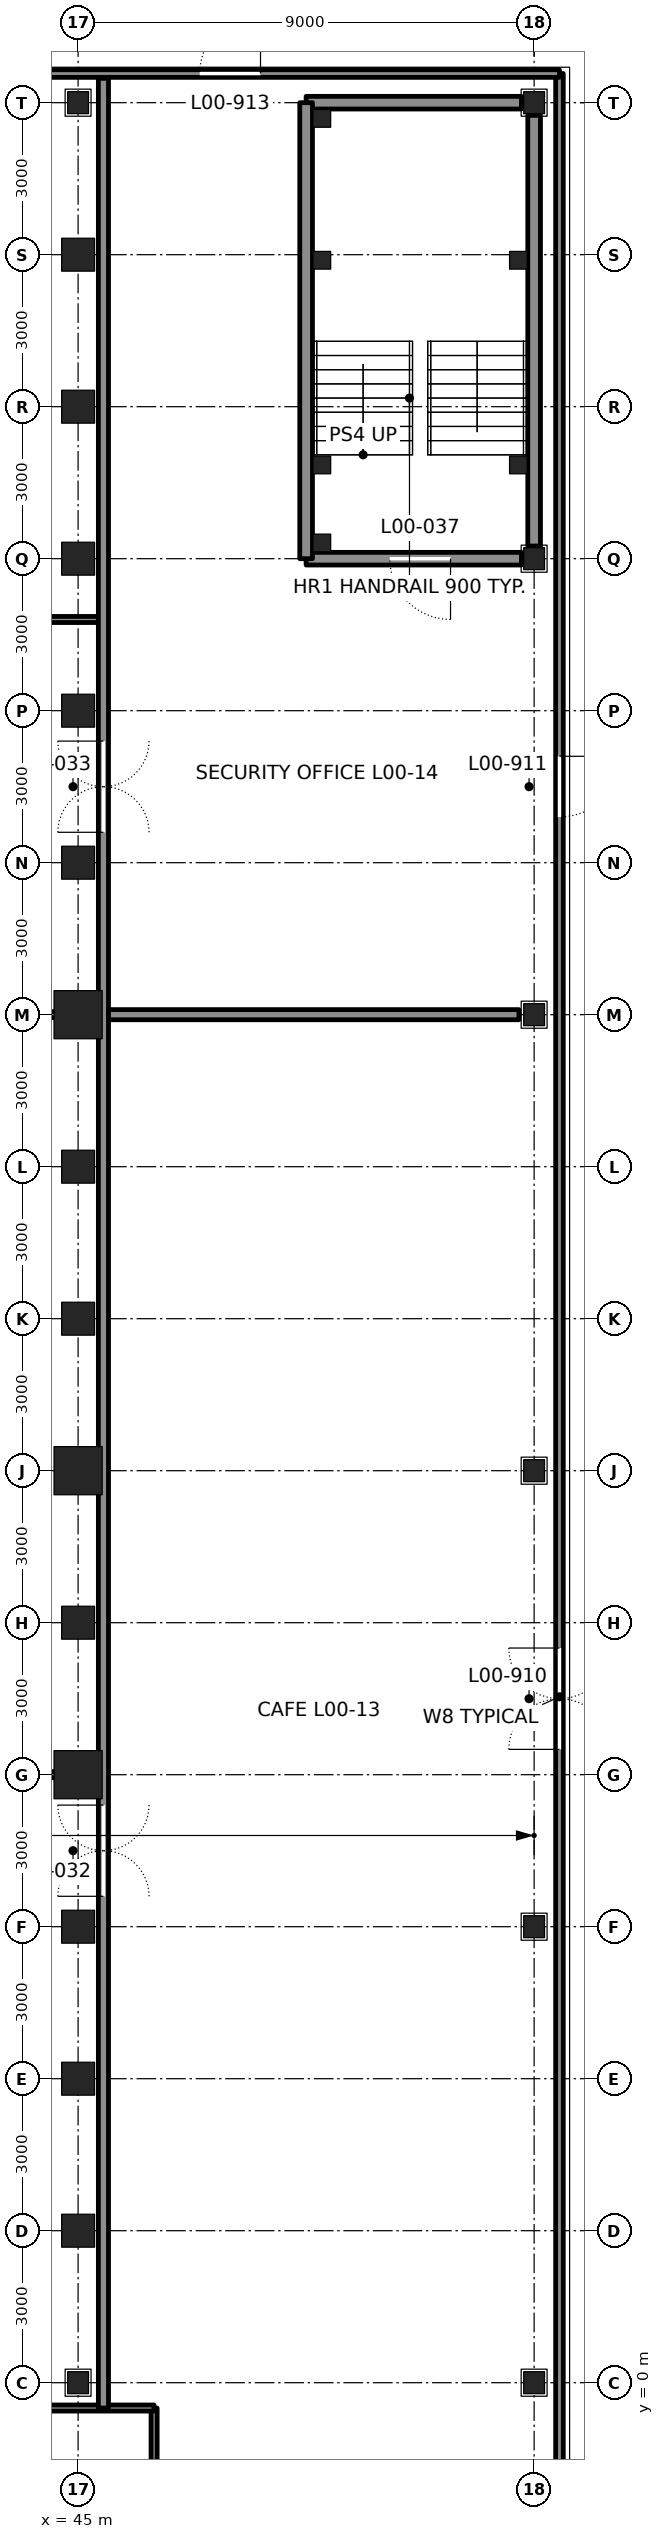
"""IFC4 building model, lengths in metres.
Left out: names, types, materials, properties, quantities, classifications, styles, units other than length and angle.
Written with IfcOpenShell. Run it as: python <this file> out.ifc"""

import sys

from ifc_helpers import new_model, si_unit, direction, frame, frame_2d, origin, origin_2d, place, context, subcontext, project, spatial, rectangle, hollow_rectangle, i_section, extrude, element, fill, save


model = new_model("IFC4")
c1 = context("Model", 3, precision=1e-05, world=origin(), true_north=direction((0.0, 1.0)))
c2 = subcontext(c1, "Body", "Model", "MODEL_VIEW")
j1 = project(units=[si_unit("LENGTHUNIT", "METRE"), si_unit("PLANEANGLEUNIT", "RADIAN")], contexts=[c1])
p1 = place(None, origin())
s1 = spatial("IfcSite", under=j1, at=p1, CompositionType="ELEMENT")
p2 = place(p1, origin())
s2 = spatial("IfcBuilding", under=s1, at=p2, CompositionType="ELEMENT")
p3 = place(p2, origin())
s3 = spatial("IfcBuildingStorey", under=s2, at=p3, CompositionType="ELEMENT", Elevation=0.0)
for number, where, z_axis, x_axis in (
    (1, (45.0, 3.0, 0.0), (0.0, 0.0, 1.0), (1.0, 0.0, 0.0)),
    (2, (45.0, 6.0, 0.0), (0.0, 0.0, 1.0), (1.0, 0.0, 0.0)),
    (3, (45.0, 9.0, 0.0), (0.0, 0.0, 1.0), (1.0, 0.0, 0.0)),
):
    element("IfcColumn", number, at=place(p3, frame(where, z_axis=z_axis, x_axis=x_axis)), inside=s3, PredefinedType="COLUMN", context=c2, shape_type="SweptSolid", body=[
        extrude(hollow_rectangle(XDim=0.65, YDim=0.65, WallThickness=0.065, at=origin_2d()), origin(), (0.0, 0.0, 1.0), 6.0),
    ])
p4 = place(p3, frame((45.0, 12.0, 0.0), z_axis=(0.0, 0.0, 1.0), x_axis=(1.0, 0.0, 0.0)))
e4 = element("IfcColumn", 4, at=p4, inside=s3, PredefinedType="COLUMN", context=c2, shape_type="SweptSolid", body=[
    extrude(hollow_rectangle(XDim=0.95, YDim=0.95, WallThickness=0.11, at=origin_2d()), origin(), (0.0, 0.0, 1.0), 6.0),
])
p5 = place(p3, frame((45.0, 15.0, 0.0), z_axis=(0.0, 0.0, 1.0), x_axis=(1.0, 0.0, 0.0)))
e5 = element("IfcColumn", 5, at=p5, inside=s3, PredefinedType="COLUMN", context=c2, shape_type="SweptSolid", body=[
    extrude(hollow_rectangle(XDim=0.65, YDim=0.65, WallThickness=0.065, at=origin_2d()), origin(), (0.0, 0.0, 1.0), 6.0),
])
p6 = place(p3, frame((45.0, 18.0, 0.0), z_axis=(0.0, 0.0, 1.0), x_axis=(1.0, 0.0, 0.0)))
e6 = element("IfcColumn", 6, at=p6, inside=s3, PredefinedType="COLUMN", context=c2, shape_type="SweptSolid", body=[
    extrude(hollow_rectangle(XDim=0.95, YDim=0.95, WallThickness=0.11, at=origin_2d()), origin(), (0.0, 0.0, 1.0), 6.0),
])
for number, where, z_axis, x_axis in (
    (7, (45.0, 21.0, 0.0), (0.0, 0.0, 1.0), (1.0, 0.0, 0.0)),
    (8, (45.0, 24.0, 0.0), (0.0, 0.0, 1.0), (1.0, 0.0, 0.0)),
):
    element("IfcColumn", number, at=place(p3, frame(where, z_axis=z_axis, x_axis=x_axis)), inside=s3, PredefinedType="COLUMN", context=c2, shape_type="SweptSolid", body=[
        extrude(hollow_rectangle(XDim=0.65, YDim=0.65, WallThickness=0.065, at=origin_2d()), origin(), (0.0, 0.0, 1.0), 6.0),
    ])
p7 = place(p3, frame((45.0, 27.0, 0.0), z_axis=(0.0, 0.0, 1.0), x_axis=(1.0, 0.0, 0.0)))
e9 = element("IfcColumn", 9, at=p7, inside=s3, PredefinedType="COLUMN", context=c2, shape_type="SweptSolid", body=[
    extrude(hollow_rectangle(XDim=0.95, YDim=0.95, WallThickness=0.11, at=origin_2d()), origin(), (0.0, 0.0, 1.0), 6.0),
])
for number, where, z_axis, x_axis in (
    (10, (45.0, 30.0, 0.0), (0.0, 0.0, 1.0), (1.0, 0.0, 0.0)),
    (11, (45.0, 33.0, 0.0), (0.0, 0.0, 1.0), (1.0, 0.0, 0.0)),
    (12, (45.0, 36.0, 0.0), (0.0, 0.0, 1.0), (1.0, 0.0, 0.0)),
    (13, (45.0, 39.0, 0.0), (0.0, 0.0, 1.0), (1.0, 0.0, 0.0)),
    (14, (45.0, 42.0, 0.0), (0.0, 0.0, 1.0), (1.0, 0.0, 0.0)),
):
    element("IfcColumn", number, at=place(p3, frame(where, z_axis=z_axis, x_axis=x_axis)), inside=s3, PredefinedType="COLUMN", context=c2, shape_type="SweptSolid", body=[
        extrude(hollow_rectangle(XDim=0.65, YDim=0.65, WallThickness=0.065, at=origin_2d()), origin(), (0.0, 0.0, 1.0), 6.0),
    ])
for number, where, z_axis, x_axis in (
    (15, (45.0, 0.0, 0.0), (0.0, 0.0, 1.0), (1.0, 0.0, 0.0)),
    (16, (45.0, 45.0, 0.0), (0.0, 0.0, 1.0), (1.0, 0.0, 0.0)),
    (17, (54.0, 0.0, 0.0), (0.0, 0.0, 1.0), (1.0, 0.0, 0.0)),
    (18, (54.0, 9.0, 0.0), (0.0, 0.0, 1.0), (1.0, 0.0, 0.0)),
    (19, (54.0, 18.0, 0.0), (0.0, 0.0, 1.0), (1.0, 0.0, 0.0)),
    (20, (54.0, 27.0, 0.0), (0.0, 0.0, 1.0), (1.0, 0.0, 0.0)),
    (21, (54.0, 36.0, 0.0), (0.0, 0.0, 1.0), (1.0, 0.0, 0.0)),
    (22, (54.0, 45.0, 0.0), (0.0, 0.0, 1.0), (1.0, 0.0, 0.0)),
):
    element("IfcColumn", number, at=place(p3, frame(where, z_axis=z_axis, x_axis=x_axis)), inside=s3, PredefinedType="COLUMN", context=c2, shape_type="SweptSolid", body=[
        extrude(i_section(OverallWidth=0.411, OverallDepth=0.434, WebThickness=0.036, FlangeThickness=0.057, at=origin_2d()), origin(), (0.0, 0.0, 1.0), 6.0),
    ])
p8 = place(p3, frame((54.5, -18.5, 0.0), z_axis=(0.0, 0.0, 1.0), x_axis=(0.0, 1.0, 0.0)))
e23 = element("IfcWall", 23, at=p8, inside=s3, PredefinedType="SOLIDWALL", context=c2, shape_type="SweptSolid", body=[
    extrude(rectangle(XDim=64.075, YDim=0.15, at=frame_2d((32.038, 0.0))), origin(), (0.0, 0.0, 1.0), 5.8),
])
p9 = place(p8, frame((31.0, 0.0, 0.0)))
e24 = element("IfcOpeningElement", 24, at=p9, cuts=e23, PredefinedType="OPENING", context=c2, shape_type="SweptSolid", body=[
    extrude(rectangle(XDim=2.0, YDim=2.4, at=frame_2d((1.0, 1.2))), frame((0.0, 0.085, 0.0), z_axis=(0.0, -1.0, 0.0), x_axis=(1.0, 0.0, 0.0)), (0.0, 0.0, 1.0), 0.17),
])
p10 = place(p8, frame((49.4, 0.0, 0.0)))
e25 = element("IfcOpeningElement", 25, at=p10, cuts=e23, PredefinedType="OPENING", context=c2, shape_type="SweptSolid", body=[
    extrude(rectangle(XDim=1.2, YDim=2.1, at=frame_2d((0.6, 1.05))), frame((0.0, 0.085, 0.0), z_axis=(0.0, -1.0, 0.0), x_axis=(1.0, 0.0, 0.0)), (0.0, 0.0, 1.0), 0.17),
])
p11 = place(p3, frame((54.5, 45.575, 0.0), z_axis=(0.0, 0.0, 1.0), x_axis=(-1.0, 0.0, 0.0)))
e26 = element("IfcWall", 26, at=p11, inside=s3, PredefinedType="SOLIDWALL", context=c2, shape_type="SweptSolid", body=[
    extrude(rectangle(XDim=64.0, YDim=0.15, at=frame_2d((32.0, 0.0))), origin(), (0.0, 0.0, 1.0), 5.8),
])
p12 = place(p11, frame((56.9, 0.0, 0.0)))
e27 = element("IfcOpeningElement", 27, at=p12, cuts=e26, PredefinedType="OPENING", context=c2, shape_type="SweptSolid", body=[
    extrude(rectangle(XDim=1.2, YDim=2.1, at=frame_2d((0.6, 1.05))), frame((0.0, 0.085, 0.0), z_axis=(0.0, -1.0, 0.0), x_axis=(1.0, 0.0, 0.0)), (0.0, 0.0, 1.0), 0.17),
])
p13 = place(p11, frame((5.9, 0.0, 0.0)))
e28 = element("IfcOpeningElement", 28, at=p13, cuts=e26, PredefinedType="OPENING", context=c2, shape_type="SweptSolid", body=[
    extrude(rectangle(XDim=1.2, YDim=2.1, at=frame_2d((0.6, 1.05))), frame((0.0, 0.085, 0.0), z_axis=(0.0, -1.0, 0.0), x_axis=(1.0, 0.0, 0.0)), (0.0, 0.0, 1.0), 0.17),
])
p14 = place(p3, frame((22.5, 34.8, 0.0), z_axis=(0.0, 0.0, 1.0), x_axis=(1.0, 0.0, 0.0)))
e29 = element("IfcWall", 29, at=p14, inside=s3, PredefinedType="PARTITIONING", context=c2, shape_type="SweptSolid", body=[
    extrude(rectangle(XDim=23.0, YDim=0.12, at=frame_2d((11.5, 0.0))), origin(), (0.0, 0.0, 1.0), 5.8),
])
p15 = place(p14, frame((11.0, 0.0, 0.0)))
e30 = element("IfcOpeningElement", 30, at=p15, cuts=e29, PredefinedType="OPENING", context=c2, shape_type="SweptSolid", body=[
    extrude(rectangle(XDim=1.0, YDim=2.4, at=frame_2d((0.5, 1.2))), frame((0.0, 0.07, 0.0), z_axis=(0.0, -1.0, 0.0), x_axis=(1.0, 0.0, 0.0)), (0.0, 0.0, 1.0), 0.14),
])
p16 = place(p3, frame((34.8, 12.0, 0.0), z_axis=(0.0, 0.0, 1.0), x_axis=(1.0, 0.0, 0.0)))
e31 = element("IfcWall", 31, at=p16, inside=s3, PredefinedType="PARTITIONING", context=c2, shape_type="SweptSolid", body=[
    extrude(rectangle(XDim=10.7, YDim=0.12, at=frame_2d((5.35, 0.0))), origin(), (0.0, 0.0, 1.0), 4.941),
])
p17 = place(p3, frame((34.8, 27.0, 0.0), z_axis=(0.0, 0.0, 1.0), x_axis=(1.0, 0.0, 0.0)))
e32 = element("IfcWall", 32, at=p17, inside=s3, PredefinedType="PARTITIONING", context=c2, shape_type="SweptSolid", body=[
    extrude(rectangle(XDim=10.7, YDim=0.12, at=frame_2d((5.35, 0.0))), origin(), (0.0, 0.0, 1.0), 4.853),
])
p18 = place(p3, frame((46.5, -18.405, 0.0), z_axis=(0.0, 0.0, 1.0), x_axis=(0.0, 1.0, 0.0)))
e33 = element("IfcWall", 33, at=p18, inside=s3, PredefinedType="PARTITIONING", context=c2, shape_type="SweptSolid", body=[
    extrude(rectangle(XDim=17.905, YDim=0.12, at=frame_2d((8.953, 0.0))), origin(), (0.0, 0.0, 1.0), 5.8),
])
p19 = place(p3, frame((36.0, -0.5, 0.0), z_axis=(0.0, 0.0, 1.0), x_axis=(1.0, 0.0, 0.0)))
e34 = element("IfcWall", 34, at=p19, inside=s3, PredefinedType="PARTITIONING", context=c2, shape_type="SweptSolid", body=[
    extrude(rectangle(XDim=10.5, YDim=0.12, at=frame_2d((5.25, 0.0))), origin(), (0.0, 0.0, 1.0), 5.8),
])
p20 = place(p3, frame((45.5, -0.5, 0.0), z_axis=(0.0, 0.0, 1.0), x_axis=(0.0, 1.0, 0.0)))
e35 = element("IfcWall", 35, at=p20, inside=s3, PredefinedType="PARTITIONING", context=c2, shape_type="SweptSolid", body=[
    extrude(rectangle(XDim=45.98, YDim=0.2, at=frame_2d((22.99, 0.0))), origin(), (0.0, 0.0, 1.0), 5.8),
])
p21 = place(p20, frame((10.1, 0.0, 0.0)))
e36 = element("IfcOpeningElement", 36, at=p21, cuts=e35, PredefinedType="OPENING", context=c2, shape_type="SweptSolid", body=[
    extrude(rectangle(XDim=1.8, YDim=2.4, at=frame_2d((0.9, 1.2))), frame((0.0, 0.11, 0.0), z_axis=(0.0, -1.0, 0.0), x_axis=(1.0, 0.0, 0.0)), (0.0, 0.0, 1.0), 0.22),
])
p22 = place(p20, frame((31.1, 0.0, 0.0)))
e37 = element("IfcOpeningElement", 37, at=p22, cuts=e35, PredefinedType="OPENING", context=c2, shape_type="SweptSolid", body=[
    extrude(rectangle(XDim=1.8, YDim=2.4, at=frame_2d((0.9, 1.2))), frame((0.0, 0.11, 0.0), z_axis=(0.0, -1.0, 0.0), x_axis=(1.0, 0.0, 0.0)), (0.0, 0.0, 1.0), 0.22),
])
p23 = place(p3, frame((45.6, 27.0, 0.0), z_axis=(0.0, 0.0, 1.0), x_axis=(1.0, 0.0, 0.0)))
e38 = element("IfcWall", 38, at=p23, inside=s3, PredefinedType="PARTITIONING", context=c2, shape_type="SweptSolid", body=[
    extrude(rectangle(XDim=8.1, YDim=0.2, at=frame_2d((4.05, 0.0))), origin(), (0.0, 0.0, 1.0), 4.853),
])
p24 = place(p3, frame((49.5, 36.0, 0.0), z_axis=(0.0, 0.0, 1.0), x_axis=(1.0, 0.0, 0.0)))
e39 = element("IfcWall", 39, at=p24, inside=s3, PredefinedType="SOLIDWALL", context=c2, shape_type="SweptSolid", body=[
    extrude(rectangle(XDim=4.25, YDim=0.25, at=frame_2d((2.125, 0.0))), origin(), (0.0, 0.0, 1.0), 4.853),
])
p25 = place(p24, frame((1.65, 0.0, 0.0)))
e40 = element("IfcOpeningElement", 40, at=p25, cuts=e39, PredefinedType="OPENING", context=c2, shape_type="SweptSolid", body=[
    extrude(rectangle(XDim=1.2, YDim=2.1, at=frame_2d((0.6, 1.05))), frame((0.0, 0.135, 0.0), z_axis=(0.0, -1.0, 0.0), x_axis=(1.0, 0.0, 0.0)), (0.0, 0.0, 1.0), 0.27),
])
p26 = place(p3, frame((54.0, 36.25, 0.0), z_axis=(0.0, 0.0, 1.0), x_axis=(0.0, 1.0, 0.0)))
e41 = element("IfcWall", 41, at=p26, inside=s3, PredefinedType="SOLIDWALL", context=c2, shape_type="SweptSolid", body=[
    extrude(rectangle(XDim=8.5, YDim=0.25, at=frame_2d((4.25, 0.0))), origin(), (0.0, 0.0, 1.0), 4.853),
])
p27 = place(p3, frame((49.5, 45.0, 0.0), z_axis=(0.0, 0.0, 1.0), x_axis=(1.0, 0.0, 0.0)))
e42 = element("IfcWall", 42, at=p27, inside=s3, PredefinedType="SOLIDWALL", context=c2, shape_type="SweptSolid", body=[
    extrude(rectangle(XDim=4.25, YDim=0.25, at=frame_2d((2.125, 0.0))), origin(), (0.0, 0.0, 1.0), 4.853),
])
p28 = place(p3, frame((49.5, 36.0, 0.0), z_axis=(0.0, 0.0, 1.0), x_axis=(0.0, 1.0, 0.0)))
e43 = element("IfcWall", 43, at=p28, inside=s3, PredefinedType="SOLIDWALL", context=c2, shape_type="SweptSolid", body=[
    extrude(rectangle(XDim=9.0, YDim=0.25, at=frame_2d((4.5, 0.0))), origin(), (0.0, 0.0, 1.0), 4.853),
])
for number, where, z_axis, x_axis in (
    (44, (49.81, 44.69, 0.0), (0.0, 0.0, 1.0), (1.0, 0.0, 0.0)),
    (45, (49.81, 41.89, 0.0), (0.0, 0.0, 1.0), (1.0, 0.0, 0.0)),
    (46, (53.69, 41.89, 0.0), (0.0, 0.0, 1.0), (1.0, 0.0, 0.0)),
    (47, (49.81, 37.85, 0.0), (0.0, 0.0, 1.0), (1.0, 0.0, 0.0)),
    (48, (53.69, 37.85, 0.0), (0.0, 0.0, 1.0), (1.0, 0.0, 0.0)),
    (49, (49.81, 36.31, 0.0), (0.0, 0.0, 1.0), (1.0, 0.0, 0.0)),
):
    element("IfcColumn", number, at=place(p3, frame(where, z_axis=z_axis, x_axis=x_axis)), inside=s3, PredefinedType="COLUMN", context=c2, shape_type="SweptSolid", body=[
        extrude(hollow_rectangle(XDim=0.35, YDim=0.35, WallThickness=0.035, at=origin_2d()), origin(), (0.0, 0.0, 1.0), 6.0),
    ])
p29 = place(p9, origin())
e50 = element("IfcDoor", 50, at=p29, inside=s3, OperationType="DOUBLE_DOOR_DOUBLE_SWING", PredefinedType="DOOR", context=c2, shape_type="SweptSolid", body=[
    extrude(rectangle(XDim=2.0, YDim=2.4, at=frame_2d((1.0, 1.2))), frame((0.0, 0.025, 0.0), z_axis=(0.0, -1.0, 0.0), x_axis=(1.0, 0.0, 0.0)), (0.0, 0.0, 1.0), 0.05),
])
fill(e24, e50)
p30 = place(p10, frame((1.2, 0.0, 0.0), z_axis=(0.0, 0.0, 1.0), x_axis=(-1.0, 0.0, 0.0)))
e51 = element("IfcDoor", 51, at=p30, inside=s3, OperationType="SINGLE_SWING_LEFT", PredefinedType="DOOR", context=c2, shape_type="SweptSolid", body=[
    extrude(rectangle(XDim=1.2, YDim=2.1, at=frame_2d((0.6, 1.05))), frame((0.0, 0.025, 0.0), z_axis=(0.0, -1.0, 0.0), x_axis=(1.0, 0.0, 0.0)), (0.0, 0.0, 1.0), 0.05),
])
fill(e25, e51)
p31 = place(p13, frame((1.2, 0.0, 0.0), z_axis=(0.0, 0.0, 1.0), x_axis=(-1.0, 0.0, 0.0)))
e52 = element("IfcDoor", 52, at=p31, inside=s3, OperationType="SINGLE_SWING_RIGHT", PredefinedType="DOOR", context=c2, shape_type="SweptSolid", body=[
    extrude(rectangle(XDim=1.2, YDim=2.1, at=frame_2d((0.6, 1.05))), frame((0.0, 0.025, 0.0), z_axis=(0.0, -1.0, 0.0), x_axis=(1.0, 0.0, 0.0)), (0.0, 0.0, 1.0), 0.05),
])
fill(e28, e52)
p32 = place(p21, origin())
e53 = element("IfcDoor", 53, at=p32, inside=s3, OperationType="DOUBLE_DOOR_DOUBLE_SWING", PredefinedType="DOOR", context=c2, shape_type="SweptSolid", body=[
    extrude(rectangle(XDim=1.8, YDim=2.4, at=frame_2d((0.9, 1.2))), frame((0.0, 0.025, 0.0), z_axis=(0.0, -1.0, 0.0), x_axis=(1.0, 0.0, 0.0)), (0.0, 0.0, 1.0), 0.05),
])
fill(e36, e53)
p33 = place(p22, origin())
e54 = element("IfcDoor", 54, at=p33, inside=s3, OperationType="DOUBLE_DOOR_DOUBLE_SWING", PredefinedType="DOOR", context=c2, shape_type="SweptSolid", body=[
    extrude(rectangle(XDim=1.8, YDim=2.4, at=frame_2d((0.9, 1.2))), frame((0.0, 0.025, 0.0), z_axis=(0.0, -1.0, 0.0), x_axis=(1.0, 0.0, 0.0)), (0.0, 0.0, 1.0), 0.05),
])
fill(e37, e54)
p34 = place(p25, frame((1.2, 0.0, 0.0), z_axis=(0.0, 0.0, 1.0), x_axis=(-1.0, 0.0, 0.0)))
e55 = element("IfcDoor", 55, at=p34, inside=s3, OperationType="SINGLE_SWING_LEFT", PredefinedType="DOOR", context=c2, shape_type="SweptSolid", body=[
    extrude(rectangle(XDim=1.2, YDim=2.1, at=frame_2d((0.6, 1.05))), frame((0.0, 0.025, 0.0), z_axis=(0.0, -1.0, 0.0), x_axis=(1.0, 0.0, 0.0)), (0.0, 0.0, 1.0), 0.05),
])
fill(e40, e55)
save(model, sys.argv[1])
